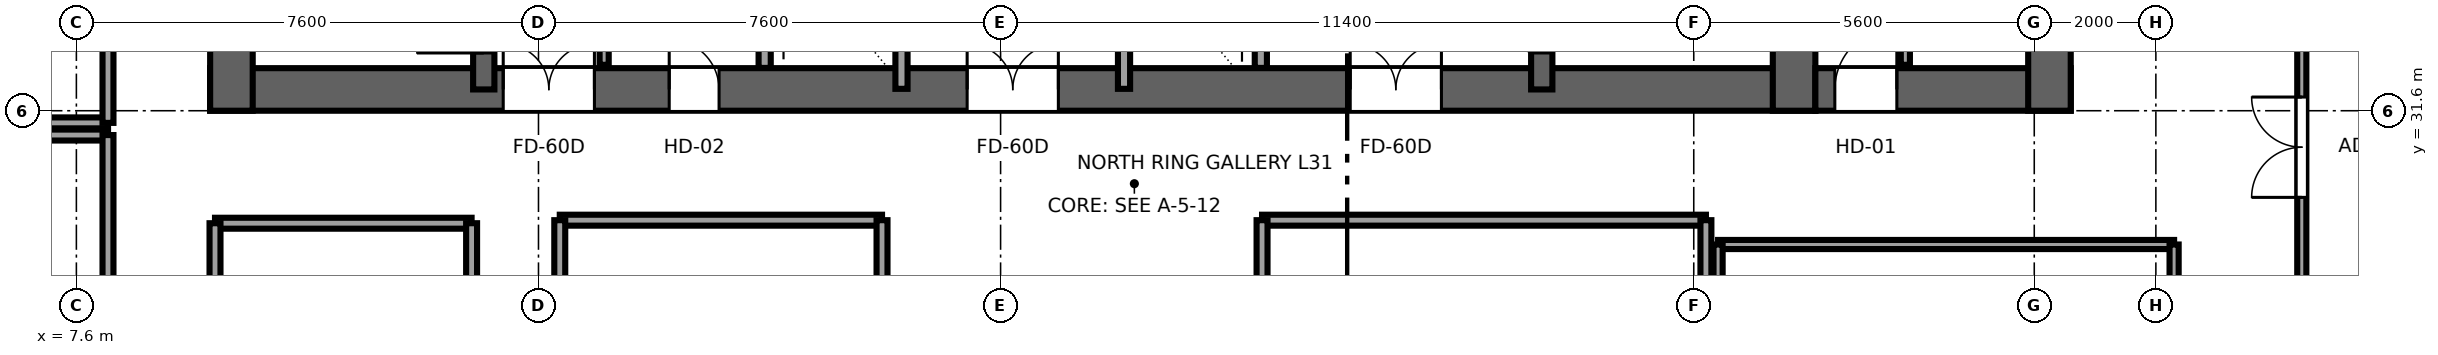
"""IFC4 building model, lengths in metres.
Left out: names, types, materials, properties, quantities, classifications, styles, units other than length and angle.
Written with IfcOpenShell. Run it as: python <this file> out.ifc"""

import sys

from ifc_helpers import new_model, si_unit, direction, frame, frame_2d, origin, place, context, subcontext, project, spatial, rectangle, extrude, source, transform, mapped, element, fill, save


model = new_model("IFC4")
c1 = context("Model", 3, precision=1e-05, world=origin(), true_north=direction((0.0, 1.0)))
c2 = subcontext(c1, "Body", "Model", "MODEL_VIEW")
j1 = project(units=[si_unit("LENGTHUNIT", "METRE"), si_unit("PLANEANGLEUNIT", "RADIAN")], contexts=[c1])
p1 = place(None, origin())
s1 = spatial("IfcSite", under=j1, at=p1, CompositionType="ELEMENT")
p2 = place(p1, origin())
s2 = spatial("IfcBuilding", under=s1, at=p2, CompositionType="ELEMENT")
p3 = place(p2, frame((0.0, 0.0, 122.2)))
s3 = spatial("IfcBuildingStorey", under=s2, at=p3, CompositionType="ELEMENT", Elevation=122.2)
p4 = place(p3, frame((9.8, 31.95, 0.0), z_axis=(0.0, 0.0, 1.0), x_axis=(1.0, 0.0, 0.0)))
e1 = element("IfcWall", 1, at=p4, inside=s3, PredefinedType="SHEAR", context=c2, shape_type="SweptSolid", body=[
    extrude(rectangle(XDim=26.4, YDim=0.7, at=frame_2d((13.2, 0.0))), origin(), (0.0, 0.0, 1.0), 3.55),
])
p5 = place(p4, frame((6.32, 0.0, 0.0), z_axis=(0.0, 0.0, 1.0), x_axis=(-1.0, 0.0, 0.0)))
e2 = element("IfcOpeningElement", 2, at=p5, cuts=e1, PredefinedType="OPENING", context=c2, shape_type="SweptSolid", body=[
    extrude(rectangle(XDim=1.5, YDim=2.04, at=frame_2d((0.75, 1.02))), frame((0.0, 0.36, 0.0), z_axis=(0.0, -1.0, 0.0), x_axis=(1.0, 0.0, 0.0)), (0.0, 0.0, 1.0), 0.72),
])
p6 = place(p4, frame((13.95, 0.0, 0.0), z_axis=(0.0, 0.0, 1.0), x_axis=(-1.0, 0.0, 0.0)))
e3 = element("IfcOpeningElement", 3, at=p6, cuts=e1, PredefinedType="OPENING", context=c2, shape_type="SweptSolid", body=[
    extrude(rectangle(XDim=1.5, YDim=2.04, at=frame_2d((0.75, 1.02))), frame((0.0, 0.36, 0.0), z_axis=(0.0, -1.0, 0.0), x_axis=(1.0, 0.0, 0.0)), (0.0, 0.0, 1.0), 0.72),
])
p7 = place(p4, frame((20.25, 0.0, 0.0), z_axis=(0.0, 0.0, 1.0), x_axis=(-1.0, 0.0, 0.0)))
e4 = element("IfcOpeningElement", 4, at=p7, cuts=e1, PredefinedType="OPENING", context=c2, shape_type="SweptSolid", body=[
    extrude(rectangle(XDim=1.5, YDim=2.04, at=frame_2d((0.75, 1.02))), frame((0.0, 0.36, 0.0), z_axis=(0.0, -1.0, 0.0), x_axis=(1.0, 0.0, 0.0)), (0.0, 0.0, 1.0), 0.72),
])
p8 = place(p4, frame((8.37, 0.0, 0.0), z_axis=(0.0, 0.0, 1.0), x_axis=(-1.0, 0.0, 0.0)))
e5 = element("IfcOpeningElement", 5, at=p8, cuts=e1, PredefinedType="OPENING", context=c2, shape_type="SweptSolid", body=[
    extrude(rectangle(XDim=0.82, YDim=2.01, at=frame_2d((0.41, 1.005))), frame((0.0, 0.36, 0.0), z_axis=(0.0, -1.0, 0.0), x_axis=(1.0, 0.0, 0.0)), (0.0, 0.0, 1.0), 0.72),
])
for number, where, z_axis, x_axis in (
    (6, (10.15, 31.6, 0.0), (0.0, 0.0, 1.0), (0.0, 1.0, 0.0)),
    (7, (35.85, 31.6, 0.0), (0.0, 0.0, 1.0), (0.0, 1.0, 0.0)),
):
    element("IfcWall", number, at=place(p3, frame(where, z_axis=z_axis, x_axis=x_axis)), inside=s3, PredefinedType="SHEAR", context=c2, shape_type="SweptSolid", body=[
        extrude(rectangle(XDim=13.6, YDim=0.7, at=frame_2d((6.8, 0.0))), origin(), (0.0, 0.0, 1.0), 3.55),
    ])
p9 = place(p3, frame((14.3, 31.95, 0.0), z_axis=(0.0, 0.0, 1.0), x_axis=(0.0, 1.0, 0.0)))
e8 = element("IfcWall", 8, at=p9, inside=s3, PredefinedType="SHEAR", context=c2, shape_type="SweptSolid", body=[
    extrude(rectangle(XDim=12.9, YDim=0.35, at=frame_2d((6.45, 0.0))), origin(), (0.0, 0.0, 1.0), 3.55),
])
p10 = place(p9, frame((0.6, 0.0, 0.0)))
e9 = element("IfcOpeningElement", 9, at=p10, cuts=e8, PredefinedType="OPENING", context=c2, shape_type="SweptSolid", body=[
    extrude(rectangle(XDim=1.1, YDim=2.12, at=frame_2d((0.55, 1.06))), frame((0.0, 0.185, 0.0), z_axis=(0.0, -1.0, 0.0), x_axis=(1.0, 0.0, 0.0)), (0.0, 0.0, 1.0), 0.37),
])
p11 = place(p3, frame((31.7, 31.95, 0.0), z_axis=(0.0, 0.0, 1.0), x_axis=(0.0, 1.0, 0.0)))
e10 = element("IfcWall", 10, at=p11, inside=s3, PredefinedType="SHEAR", context=c2, shape_type="SweptSolid", body=[
    extrude(rectangle(XDim=12.9, YDim=0.35, at=frame_2d((6.45, 0.0))), origin(), (0.0, 0.0, 1.0), 3.55),
])
p12 = place(p11, frame((1.7, 0.0, 0.0), z_axis=(0.0, 0.0, 1.0), x_axis=(-1.0, 0.0, 0.0)))
e11 = element("IfcOpeningElement", 11, at=p12, cuts=e10, PredefinedType="OPENING", context=c2, shape_type="SweptSolid", body=[
    extrude(rectangle(XDim=1.1, YDim=2.12, at=frame_2d((0.55, 1.06))), frame((0.0, 0.185, 0.0), z_axis=(0.0, -1.0, 0.0), x_axis=(1.0, 0.0, 0.0)), (0.0, 0.0, 1.0), 0.37),
])
p13 = place(p3, frame((36.2, 31.95, 0.0), z_axis=(0.0, 0.0, 1.0), x_axis=(1.0, 0.0, 0.0)))
e12 = element("IfcWall", 12, at=p13, inside=s3, PredefinedType="SHEAR", context=c2, shape_type="SweptSolid", body=[
    extrude(rectangle(XDim=4.2, YDim=0.7, at=frame_2d((2.1, 0.0))), origin(), (0.0, 0.0, 1.0), 3.55),
])
p14 = place(p13, frame((1.34, 0.0, 0.0), z_axis=(0.0, 0.0, 1.0), x_axis=(-1.0, 0.0, 0.0)))
e13 = element("IfcOpeningElement", 13, at=p14, cuts=e12, PredefinedType="OPENING", context=c2, shape_type="SweptSolid", body=[
    extrude(rectangle(XDim=1.02, YDim=2.03, at=frame_2d((0.51, 1.015))), frame((0.0, 0.36, 0.0), z_axis=(0.0, -1.0, 0.0), x_axis=(1.0, 0.0, 0.0)), (0.0, 0.0, 1.0), 0.72),
])
p15 = place(p3, frame((40.05, 31.6, 0.0), z_axis=(0.0, 0.0, 1.0), x_axis=(0.0, 1.0, 0.0)))
e14 = element("IfcWall", 14, at=p15, inside=s3, PredefinedType="SHEAR", context=c2, shape_type="SweptSolid", body=[
    extrude(rectangle(XDim=13.6, YDim=0.7, at=frame_2d((6.8, 0.0))), origin(), (0.0, 0.0, 1.0), 3.55),
])
for number, where, z_axis, x_axis in (
    (15, (18.92, 32.304, 0.0), (0.0, 0.0, 1.0), (0.0, 1.0, 0.0)),
    (16, (27.08, 32.304, 0.0), (0.0, 0.0, 1.0), (0.0, 1.0, 0.0)),
):
    element("IfcWall", number, at=place(p3, frame(where, z_axis=z_axis, x_axis=x_axis)), inside=s3, PredefinedType="SOLIDWALL", context=c2, shape_type="SweptSolid", body=[
        extrude(rectangle(XDim=3.846, YDim=0.2, at=frame_2d((1.923, 0.0))), origin(), (0.0, 0.0, 1.0), 3.37),
    ])
p16 = place(p3, frame((21.17, 31.96, 0.0), z_axis=(0.0, 0.0, 1.0), x_axis=(0.0, 1.0, 0.0)))
e17 = element("IfcWall", 17, at=p16, inside=s3, PredefinedType="SOLIDWALL", context=c2, shape_type="SweptSolid", body=[
    extrude(rectangle(XDim=12.58, YDim=0.2, at=frame_2d((6.29, 0.0))), origin(), (0.0, 0.0, 1.0), 3.37),
])
p17 = place(p16, frame((5.74, 0.0, 0.0)))
e18 = element("IfcOpeningElement", 18, at=p17, cuts=e17, PredefinedType="OPENING", context=c2, shape_type="SweptSolid", body=[
    extrude(rectangle(XDim=1.1, YDim=2.12, at=frame_2d((0.55, 1.06))), frame((0.0, 0.11, 0.0), z_axis=(0.0, -1.0, 0.0), x_axis=(1.0, 0.0, 0.0)), (0.0, 0.0, 1.0), 0.22),
])
p18 = place(p16, frame((8.24, 0.0, 0.0)))
e19 = element("IfcOpeningElement", 19, at=p18, cuts=e17, PredefinedType="OPENING", context=c2, shape_type="SweptSolid", body=[
    extrude(rectangle(XDim=1.1, YDim=2.12, at=frame_2d((0.55, 1.06))), frame((0.0, 0.11, 0.0), z_axis=(0.0, -1.0, 0.0), x_axis=(1.0, 0.0, 0.0)), (0.0, 0.0, 1.0), 0.22),
])
p19 = place(p3, frame((24.83, 31.96, 0.0), z_axis=(0.0, 0.0, 1.0), x_axis=(0.0, 1.0, 0.0)))
e20 = element("IfcWall", 20, at=p19, inside=s3, PredefinedType="SOLIDWALL", context=c2, shape_type="SweptSolid", body=[
    extrude(rectangle(XDim=12.58, YDim=0.2, at=frame_2d((6.29, 0.0))), origin(), (0.0, 0.0, 1.0), 3.37),
])
p20 = place(p19, frame((5.74, 0.0, 0.0)))
e21 = element("IfcOpeningElement", 21, at=p20, cuts=e20, PredefinedType="OPENING", context=c2, shape_type="SweptSolid", body=[
    extrude(rectangle(XDim=1.1, YDim=2.12, at=frame_2d((0.55, 1.06))), frame((0.0, 0.11, 0.0), z_axis=(0.0, -1.0, 0.0), x_axis=(1.0, 0.0, 0.0)), (0.0, 0.0, 1.0), 0.22),
])
p21 = place(p19, frame((8.24, 0.0, 0.0)))
e22 = element("IfcOpeningElement", 22, at=p21, cuts=e20, PredefinedType="OPENING", context=c2, shape_type="SweptSolid", body=[
    extrude(rectangle(XDim=1.1, YDim=2.12, at=frame_2d((0.55, 1.06))), frame((0.0, 0.11, 0.0), z_axis=(0.0, -1.0, 0.0), x_axis=(1.0, 0.0, 0.0)), (0.0, 0.0, 1.0), 0.22),
])
p22 = place(p3, frame((16.28, 32.355, 0.0), z_axis=(0.0, 0.0, 1.0), x_axis=(0.0, 1.0, 0.0)))
e23 = element("IfcWall", 23, at=p22, inside=s3, PredefinedType="PARTITIONING", context=c2, shape_type="SweptSolid", body=[
    extrude(rectangle(XDim=0.865, YDim=0.15, at=frame_2d((0.433, 0.0))), origin(), (0.0, 0.0, 1.0), 3.37),
])
p23 = place(p3, frame((37.68, 32.355, 0.0), z_axis=(0.0, 0.0, 1.0), x_axis=(0.0, 1.0, 0.0)))
e24 = element("IfcWall", 24, at=p23, inside=s3, PredefinedType="PARTITIONING", context=c2, shape_type="SweptSolid", body=[
    extrude(rectangle(XDim=3.845, YDim=0.15, at=frame_2d((1.922, 0.0))), origin(), (0.0, 0.0, 1.0), 3.37),
])
p24 = place(p23, frame((1.413, 0.0, 0.0)))
e25 = element("IfcOpeningElement", 25, at=p24, cuts=e24, PredefinedType="OPENING", context=c2, shape_type="SweptSolid", body=[
    extrude(rectangle(XDim=1.02, YDim=2.03, at=frame_2d((0.51, 1.015))), frame((0.0, 0.085, 0.0), z_axis=(0.0, -1.0, 0.0), x_axis=(1.0, 0.0, 0.0)), (0.0, 0.0, 1.0), 0.17),
])
p25 = place(p3, frame((0.405, 31.2, 0.0), z_axis=(0.0, 0.0, 1.0), x_axis=(1.0, 0.0, 0.0)))
e26 = element("IfcWall", 26, at=p25, inside=s3, PredefinedType="PARTITIONING", context=c2, shape_type="SweptSolid", body=[
    extrude(rectangle(XDim=7.715, YDim=0.18, at=frame_2d((3.857, 0.0))), origin(), (0.0, 0.0, 1.0), 3.37),
])
p26 = place(p3, frame((8.12, 23.6, 0.0), z_axis=(0.0, 0.0, 1.0), x_axis=(0.0, 1.0, 0.0)))
e27 = element("IfcWall", 27, at=p26, inside=s3, PredefinedType="PARTITIONING", context=c2, shape_type="SweptSolid", body=[
    extrude(rectangle(XDim=7.6, YDim=0.18, at=frame_2d((3.8, 0.0))), origin(), (0.0, 0.0, 1.0), 3.37),
])
p27 = place(p26, frame((2.975, 0.0, 0.0)))
e28 = element("IfcOpeningElement", 28, at=p27, cuts=e27, PredefinedType="OPENING", context=c2, shape_type="SweptSolid", body=[
    extrude(rectangle(XDim=1.65, YDim=2.15, at=frame_2d((0.825, 1.075))), frame((0.0, 0.1, 0.0), z_axis=(0.0, -1.0, 0.0), x_axis=(1.0, 0.0, 0.0)), (0.0, 0.0, 1.0), 0.2),
])
p28 = place(p3, frame((0.405, 31.4, 0.0), z_axis=(0.0, 0.0, 1.0), x_axis=(1.0, 0.0, 0.0)))
e29 = element("IfcWall", 29, at=p28, inside=s3, PredefinedType="PARTITIONING", context=c2, shape_type="SweptSolid", body=[
    extrude(rectangle(XDim=7.715, YDim=0.18, at=frame_2d((3.857, 0.0))), origin(), (0.0, 0.0, 1.0), 3.37),
])
p29 = place(p3, frame((8.12, 31.4, 0.0), z_axis=(0.0, 0.0, 1.0), x_axis=(0.0, 1.0, 0.0)))
e30 = element("IfcWall", 30, at=p29, inside=s3, PredefinedType="PARTITIONING", context=c2, shape_type="SweptSolid", body=[
    extrude(rectangle(XDim=6.8, YDim=0.18, at=frame_2d((3.4, 0.0))), origin(), (0.0, 0.0, 1.0), 3.37),
])
p30 = place(p29, frame((3.175, 0.0, 0.0)))
e31 = element("IfcOpeningElement", 31, at=p30, cuts=e30, PredefinedType="OPENING", context=c2, shape_type="SweptSolid", body=[
    extrude(rectangle(XDim=1.65, YDim=2.15, at=frame_2d((0.825, 1.075))), frame((0.0, 0.1, 0.0), z_axis=(0.0, -1.0, 0.0), x_axis=(1.0, 0.0, 0.0)), (0.0, 0.0, 1.0), 0.2),
])
p31 = place(p3, frame((44.2, 27.4, 0.0), z_axis=(0.0, 0.0, 1.0), x_axis=(0.0, 1.0, 0.0)))
e32 = element("IfcWall", 32, at=p31, inside=s3, PredefinedType="PARTITIONING", context=c2, shape_type="SweptSolid", body=[
    extrude(rectangle(XDim=7.2, YDim=0.15, at=frame_2d((3.6, 0.0))), origin(), (0.0, 0.0, 1.0), 3.37),
])
p32 = place(p31, frame((2.775, 0.0, 0.0)))
e33 = element("IfcOpeningElement", 33, at=p32, cuts=e32, PredefinedType="OPENING", context=c2, shape_type="SweptSolid", body=[
    extrude(rectangle(XDim=1.65, YDim=2.15, at=frame_2d((0.825, 1.075))), frame((0.0, 0.085, 0.0), z_axis=(0.0, -1.0, 0.0), x_axis=(1.0, 0.0, 0.0)), (0.0, 0.0, 1.0), 0.17),
])
p33 = place(p3, frame((9.88, 29.75, 0.0), z_axis=(0.0, 0.0, 1.0), x_axis=(1.0, 0.0, 0.0)))
e34 = element("IfcWall", 34, at=p33, inside=s3, PredefinedType="PARTITIONING", context=c2, shape_type="SweptSolid", body=[
    extrude(rectangle(XDim=4.22, YDim=0.18, at=frame_2d((2.11, 0.0))), origin(), (0.0, 0.0, 1.0), 3.37),
])
for number, where, z_axis, x_axis in (
    (35, (9.88, 23.6, 0.0), (0.0, 0.0, 1.0), (0.0, 1.0, 0.0)),
    (36, (14.1, 23.6, 0.0), (0.0, 0.0, 1.0), (0.0, 1.0, 0.0)),
):
    element("IfcWall", number, at=place(p3, frame(where, z_axis=z_axis, x_axis=x_axis)), inside=s3, PredefinedType="PARTITIONING", context=c2, shape_type="SweptSolid", body=[
        extrude(rectangle(XDim=6.15, YDim=0.18, at=frame_2d((3.075, 0.0))), origin(), (0.0, 0.0, 1.0), 3.37),
    ])
p34 = place(p3, frame((27.1, 29.8, 0.0), z_axis=(0.0, 0.0, 1.0), x_axis=(1.0, 0.0, 0.0)))
e37 = element("IfcWall", 37, at=p34, inside=s3, PredefinedType="PARTITIONING", context=c2, shape_type="SweptSolid", body=[
    extrude(rectangle(XDim=7.3, YDim=0.18, at=frame_2d((3.65, 0.0))), origin(), (0.0, 0.0, 1.0), 3.37),
])
for number, where, z_axis, x_axis in (
    (38, (27.1, 23.6, 0.0), (0.0, 0.0, 1.0), (0.0, 1.0, 0.0)),
    (39, (34.4, 23.6, 0.0), (0.0, 0.0, 1.0), (0.0, 1.0, 0.0)),
):
    element("IfcWall", number, at=place(p3, frame(where, z_axis=z_axis, x_axis=x_axis)), inside=s3, PredefinedType="PARTITIONING", context=c2, shape_type="SweptSolid", body=[
        extrude(rectangle(XDim=6.2, YDim=0.18, at=frame_2d((3.1, 0.0))), origin(), (0.0, 0.0, 1.0), 3.37),
    ])
p35 = place(p3, frame((15.55, 29.8, 0.0), z_axis=(0.0, 0.0, 1.0), x_axis=(1.0, 0.0, 0.0)))
e40 = element("IfcWall", 40, at=p35, inside=s3, PredefinedType="PARTITIONING", context=c2, shape_type="SweptSolid", body=[
    extrude(rectangle(XDim=5.3, YDim=0.18, at=frame_2d((2.65, 0.0))), origin(), (0.0, 0.0, 1.0), 3.37),
])
for number, where, z_axis, x_axis in (
    (41, (15.55, 23.6, 0.0), (0.0, 0.0, 1.0), (0.0, 1.0, 0.0)),
    (42, (20.85, 23.6, 0.0), (0.0, 0.0, 1.0), (0.0, 1.0, 0.0)),
):
    element("IfcWall", number, at=place(p3, frame(where, z_axis=z_axis, x_axis=x_axis)), inside=s3, PredefinedType="PARTITIONING", context=c2, shape_type="SweptSolid", body=[
        extrude(rectangle(XDim=6.2, YDim=0.18, at=frame_2d((3.1, 0.0))), origin(), (0.0, 0.0, 1.0), 3.37),
    ])
p36 = place(p3, frame((34.6, 29.4, 0.0), z_axis=(0.0, 0.0, 1.0), x_axis=(1.0, 0.0, 0.0)))
e43 = element("IfcWall", 43, at=p36, inside=s3, PredefinedType="PARTITIONING", context=c2, shape_type="SweptSolid", body=[
    extrude(rectangle(XDim=7.5, YDim=0.15, at=frame_2d((3.75, 0.0))), origin(), (0.0, 0.0, 1.0), 3.37),
])
p37 = place(p3, frame((34.6, 23.6, 0.0), z_axis=(0.0, 0.0, 1.0), x_axis=(0.0, 1.0, 0.0)))
e44 = element("IfcWall", 44, at=p37, inside=s3, PredefinedType="PARTITIONING", context=c2, shape_type="SweptSolid", body=[
    extrude(rectangle(XDim=5.8, YDim=0.15, at=frame_2d((2.9, 0.0))), origin(), (0.0, 0.0, 1.0), 3.37),
])
p38 = place(p3, frame((42.1, 23.6, 0.0), z_axis=(0.0, 0.0, 1.0), x_axis=(0.0, 1.0, 0.0)))
e45 = element("IfcWall", 45, at=p38, inside=s3, PredefinedType="PARTITIONING", context=c2, shape_type="SweptSolid", body=[
    extrude(rectangle(XDim=5.8, YDim=0.15, at=frame_2d((2.9, 0.0))), origin(), (0.0, 0.0, 1.0), 2.16),
])
m1 = source(origin(), c2, "Body", "SweptSolid", [
    extrude(rectangle(XDim=1.1, YDim=2.12, at=frame_2d((0.55, 1.06))), frame((0.0, 0.025, 0.0), z_axis=(0.0, -1.0, 0.0), x_axis=(1.0, 0.0, 0.0)), (0.0, 0.0, 1.0), 0.05),
])
p39 = place(p10, origin())
e46 = element("IfcDoor", 46, at=p39, inside=s3, OperationType="SINGLE_SWING_LEFT", PredefinedType="DOOR", context=c2, shape_type="MappedRepresentation", body=[
    mapped(m1, transform((0.0, 0.0, 0.0), x_axis=(1.0, 0.0, 0.0), y_axis=(0.0, 1.0, 0.0), z_axis=(0.0, 0.0, 1.0), scale=1.0)),
])
fill(e9, e46)
p40 = place(p12, origin())
e47 = element("IfcDoor", 47, at=p40, inside=s3, OperationType="SINGLE_SWING_RIGHT", PredefinedType="DOOR", context=c2, shape_type="MappedRepresentation", body=[
    mapped(m1, transform((0.0, 0.0, 0.0), x_axis=(1.0, 0.0, 0.0), y_axis=(0.0, 1.0, 0.0), z_axis=(0.0, 0.0, 1.0), scale=1.0)),
])
fill(e11, e47)
m2 = source(origin(), c2, "Body", "SweptSolid", [
    extrude(rectangle(XDim=1.5, YDim=2.04, at=frame_2d((0.75, 1.02))), frame((0.0, 0.025, 0.0), z_axis=(0.0, -1.0, 0.0), x_axis=(1.0, 0.0, 0.0)), (0.0, 0.0, 1.0), 0.05),
])
p41 = place(p5, origin())
e48 = element("IfcDoor", 48, at=p41, inside=s3, OperationType="DOUBLE_DOOR_SINGLE_SWING", PredefinedType="DOOR", context=c2, shape_type="MappedRepresentation", body=[
    mapped(m2, transform((0.0, 0.0, 0.0), x_axis=(1.0, 0.0, 0.0), y_axis=(0.0, 1.0, 0.0), z_axis=(0.0, 0.0, 1.0), scale=1.0)),
])
fill(e2, e48)
p42 = place(p6, origin())
e49 = element("IfcDoor", 49, at=p42, inside=s3, OperationType="DOUBLE_DOOR_SINGLE_SWING", PredefinedType="DOOR", context=c2, shape_type="MappedRepresentation", body=[
    mapped(m2, transform((0.0, 0.0, 0.0), x_axis=(1.0, 0.0, 0.0), y_axis=(0.0, 1.0, 0.0), z_axis=(0.0, 0.0, 1.0), scale=1.0)),
])
fill(e3, e49)
p43 = place(p7, origin())
e50 = element("IfcDoor", 50, at=p43, inside=s3, OperationType="DOUBLE_DOOR_SINGLE_SWING", PredefinedType="DOOR", context=c2, shape_type="MappedRepresentation", body=[
    mapped(m2, transform((0.0, 0.0, 0.0), x_axis=(1.0, 0.0, 0.0), y_axis=(0.0, 1.0, 0.0), z_axis=(0.0, 0.0, 1.0), scale=1.0)),
])
fill(e4, e50)
m3 = source(origin(), c2, "Body", "SweptSolid", [
    extrude(rectangle(XDim=0.82, YDim=2.01, at=frame_2d((0.41, 1.005))), frame((0.0, 0.025, 0.0), z_axis=(0.0, -1.0, 0.0), x_axis=(1.0, 0.0, 0.0)), (0.0, 0.0, 1.0), 0.05),
])
p44 = place(p8, origin())
e51 = element("IfcDoor", 51, at=p44, inside=s3, OperationType="SINGLE_SWING_LEFT", PredefinedType="DOOR", context=c2, shape_type="MappedRepresentation", body=[
    mapped(m3, transform((0.0, 0.0, 0.0), x_axis=(1.0, 0.0, 0.0), y_axis=(0.0, 1.0, 0.0), z_axis=(0.0, 0.0, 1.0), scale=1.0)),
])
fill(e5, e51)
m4 = source(origin(), c2, "Body", "SweptSolid", [
    extrude(rectangle(XDim=1.02, YDim=2.03, at=frame_2d((0.51, 1.015))), frame((0.0, 0.025, 0.0), z_axis=(0.0, -1.0, 0.0), x_axis=(1.0, 0.0, 0.0)), (0.0, 0.0, 1.0), 0.05),
])
p45 = place(p14, origin())
e52 = element("IfcDoor", 52, at=p45, inside=s3, OperationType="SINGLE_SWING_RIGHT", PredefinedType="DOOR", context=c2, shape_type="MappedRepresentation", body=[
    mapped(m4, transform((0.0, 0.0, 0.0), x_axis=(1.0, 0.0, 0.0), y_axis=(0.0, 1.0, 0.0), z_axis=(0.0, 0.0, 1.0), scale=1.0)),
])
fill(e13, e52)
m5 = source(origin(), c2, "Body", "SweptSolid", [
    extrude(rectangle(XDim=1.65, YDim=2.15, at=frame_2d((0.825, 1.075))), frame((0.0, 0.025, 0.0), z_axis=(0.0, -1.0, 0.0), x_axis=(1.0, 0.0, 0.0)), (0.0, 0.0, 1.0), 0.05),
])
p46 = place(p32, origin())
e53 = element("IfcDoor", 53, at=p46, inside=s3, OperationType="DOUBLE_DOOR_SINGLE_SWING", PredefinedType="DOOR", context=c2, shape_type="MappedRepresentation", body=[
    mapped(m5, transform((0.0, 0.0, 0.0), x_axis=(1.0, 0.0, 0.0), y_axis=(0.0, 1.0, 0.0), z_axis=(0.0, 0.0, 1.0), scale=1.0)),
])
fill(e33, e53)
save(model, sys.argv[1])
